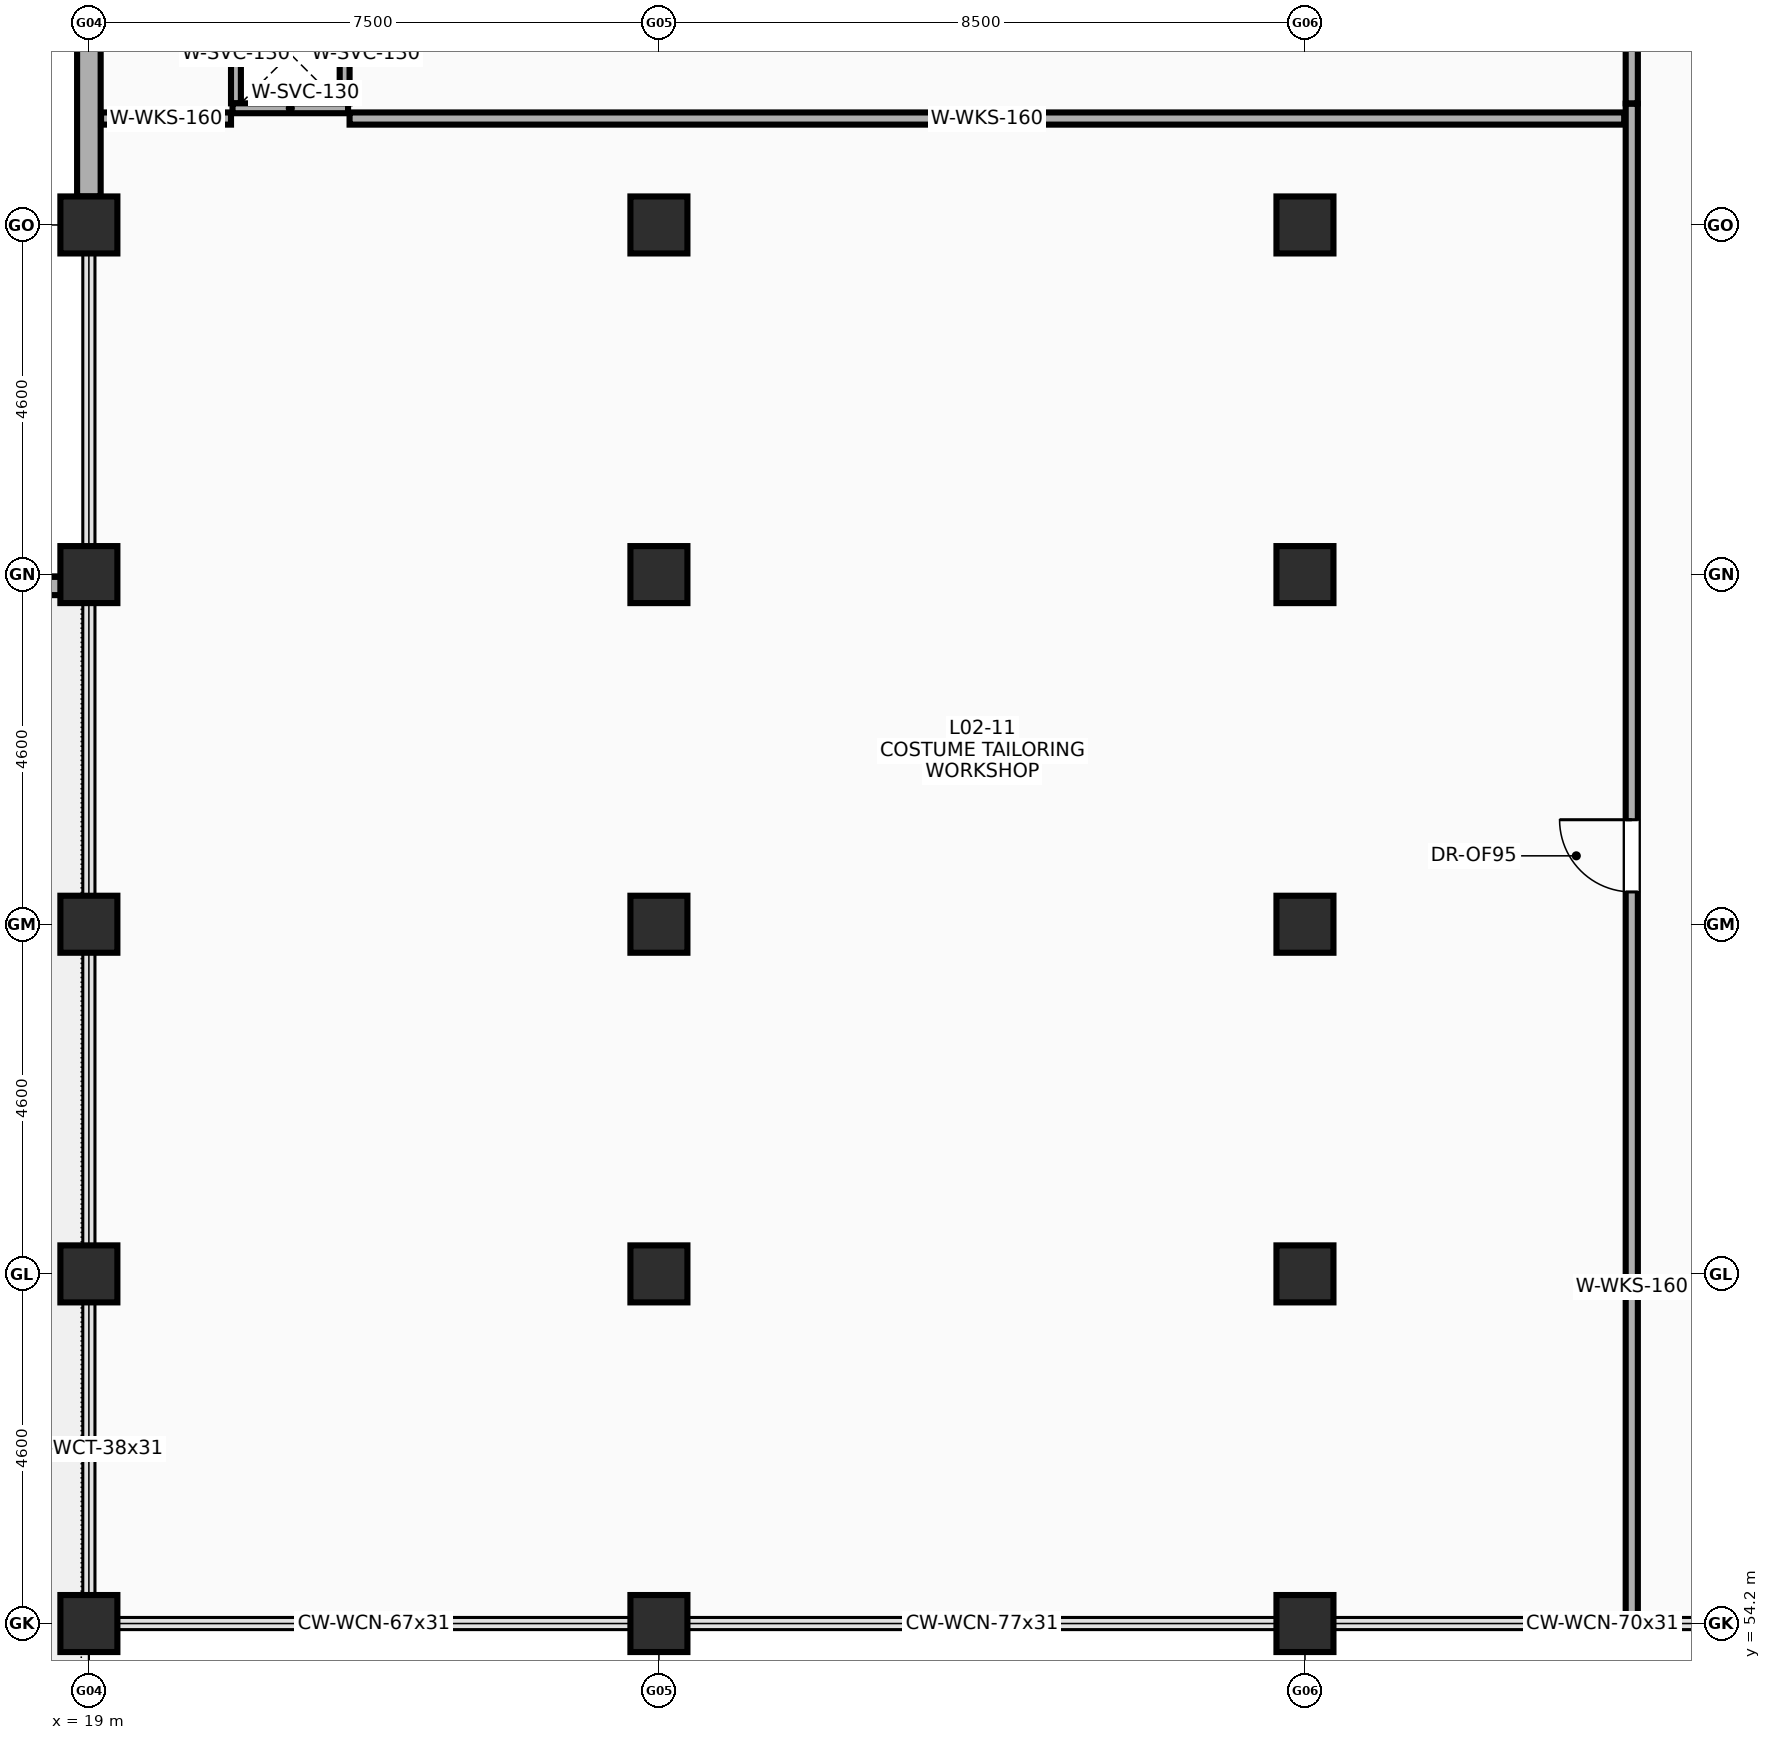
"""IFC4 building model, lengths in metres.
Left out: names, types, materials, properties, quantities, classifications, styles, units other than length and angle.
Written with IfcOpenShell. Run it as: python <this file> out.ifc"""

import sys

from ifc_helpers import new_model, si_unit, direction, frame, frame_2d, origin, origin_2d, place, context, subcontext, project, spatial, rectangle, extrude, element, fill, save


model = new_model("IFC4")
c1 = context("Model", 3, precision=1e-05, world=origin(), true_north=direction((0.0, 1.0)))
c2 = subcontext(c1, "Body", "Model", "MODEL_VIEW")
j1 = project(units=[si_unit("LENGTHUNIT", "METRE"), si_unit("PLANEANGLEUNIT", "RADIAN")], contexts=[c1])
p1 = place(None, origin())
s1 = spatial("IfcSite", under=j1, at=p1, CompositionType="ELEMENT")
p2 = place(p1, origin())
s2 = spatial("IfcBuilding", under=s1, at=p2, CompositionType="ELEMENT")
p3 = place(p2, frame((0.0, 0.0, 9.8)))
s3 = spatial("IfcBuildingStorey", under=s2, at=p3, CompositionType="ELEMENT", Elevation=9.8)
for number, where, z_axis, x_axis in (
    (1, (19.0, 54.2, 0.0), (0.0, 0.0, 1.0), (1.0, 0.0, 0.0)),
    (2, (19.0, 58.8, 0.0), (0.0, 0.0, 1.0), (1.0, 0.0, 0.0)),
    (3, (19.0, 63.4, 0.0), (0.0, 0.0, 1.0), (1.0, 0.0, 0.0)),
    (4, (19.0, 68.0, 0.0), (0.0, 0.0, 1.0), (1.0, 0.0, 0.0)),
    (5, (19.0, 72.6, 0.0), (0.0, 0.0, 1.0), (1.0, 0.0, 0.0)),
    (6, (26.5, 54.2, 0.0), (0.0, 0.0, 1.0), (1.0, 0.0, 0.0)),
    (7, (26.5, 58.8, 0.0), (0.0, 0.0, 1.0), (1.0, 0.0, 0.0)),
    (8, (26.5, 63.4, 0.0), (0.0, 0.0, 1.0), (1.0, 0.0, 0.0)),
    (9, (26.5, 68.0, 0.0), (0.0, 0.0, 1.0), (1.0, 0.0, 0.0)),
    (10, (26.5, 72.6, 0.0), (0.0, 0.0, 1.0), (1.0, 0.0, 0.0)),
    (11, (35.0, 54.2, 0.0), (0.0, 0.0, 1.0), (1.0, 0.0, 0.0)),
    (12, (35.0, 58.8, 0.0), (0.0, 0.0, 1.0), (1.0, 0.0, 0.0)),
    (13, (35.0, 63.4, 0.0), (0.0, 0.0, 1.0), (1.0, 0.0, 0.0)),
    (14, (35.0, 68.0, 0.0), (0.0, 0.0, 1.0), (1.0, 0.0, 0.0)),
    (15, (35.0, 72.6, 0.0), (0.0, 0.0, 1.0), (1.0, 0.0, 0.0)),
):
    element("IfcColumn", number, at=place(p3, frame(where, z_axis=z_axis, x_axis=x_axis)), inside=s3, PredefinedType="COLUMN", context=c2, shape_type="SweptSolid", body=[
        extrude(rectangle(XDim=0.75, YDim=0.75, at=origin_2d()), origin(), (0.0, 0.0, 1.0), 4.4),
    ])
p4 = place(p3, frame((19.0, 72.975, 0.0), z_axis=(0.0, 0.0, 1.0), x_axis=(0.0, 1.0, 0.0)))
e16 = element("IfcWall", 16, at=p4, inside=s3, PredefinedType="SOLIDWALL", context=c2, shape_type="SweptSolid", body=[
    extrude(rectangle(XDim=7.85, YDim=0.31, at=frame_2d((3.925, 0.0))), origin(), (0.0, 0.0, 1.0), 3.15),
])
p5 = place(p4, frame((2.705, 0.0, 0.9)))
e17 = element("IfcOpeningElement", 17, at=p5, cuts=e16, PredefinedType="OPENING", context=c2, shape_type="SweptSolid", body=[
    extrude(rectangle(XDim=2.4, YDim=1.9, at=frame_2d((1.2, 0.95))), frame((0.0, 0.165, 0.0), z_axis=(0.0, -1.0, 0.0), x_axis=(1.0, 0.0, 0.0)), (0.0, 0.0, 1.0), 0.33),
])
p6 = place(p3, frame((6.15, 67.85, 0.0), z_axis=(0.0, 0.0, 1.0), x_axis=(1.0, 0.0, 0.0)))
e18 = element("IfcWall", 18, at=p6, inside=s3, PredefinedType="PARAPET", context=c2, shape_type="SweptSolid", body=[
    extrude(rectangle(XDim=12.7, YDim=0.24, at=frame_2d((6.35, 0.0))), origin(), (0.0, 0.0, 1.0), 0.65),
])
for number, where, z_axis, x_axis in (
    (19, (20.935, 74.2, 0.0), (0.0, 0.0, 1.0), (0.0, 1.0, 0.0)),
    (20, (22.365, 74.2, 0.0), (0.0, 0.0, 1.0), (0.0, 1.0, 0.0)),
):
    element("IfcWall", number, at=place(p3, frame(where, z_axis=z_axis, x_axis=x_axis)), inside=s3, PredefinedType="PARTITIONING", context=c2, shape_type="SweptSolid", body=[
        extrude(rectangle(XDim=1.3, YDim=0.13, at=frame_2d((0.65, 0.0))), origin(), (0.0, 0.0, 1.0), 4.1),
    ])
p7 = place(p3, frame((39.3, 54.285, 0.0), z_axis=(0.0, 0.0, 1.0), x_axis=(0.0, 1.0, 0.0)))
e21 = element("IfcWall", 21, at=p7, inside=s3, PredefinedType="PARTITIONING", context=c2, shape_type="SweptSolid", body=[
    extrude(rectangle(XDim=19.91, YDim=0.16, at=frame_2d((9.955, 0.0))), origin(), (0.0, 0.0, 1.0), 3.3),
])
p8 = place(p7, frame((9.54, 0.0, 0.0)))
e22 = element("IfcOpeningElement", 22, at=p8, cuts=e21, PredefinedType="OPENING", context=c2, shape_type="SweptSolid", body=[
    extrude(rectangle(XDim=0.95, YDim=2.15, at=frame_2d((0.475, 1.075))), frame((0.0, 0.09, 0.0), z_axis=(0.0, -1.0, 0.0), x_axis=(1.0, 0.0, 0.0)), (0.0, 0.0, 1.0), 0.18),
])
p9 = place(p3, frame((39.3, 74.2, 0.0), z_axis=(0.0, 0.0, 1.0), x_axis=(0.0, 1.0, 0.0)))
e23 = element("IfcWall", 23, at=p9, inside=s3, PredefinedType="PARTITIONING", context=c2, shape_type="SweptSolid", body=[
    extrude(rectangle(XDim=11.135, YDim=0.16, at=frame_2d((5.567, 0.0))), origin(), (0.0, 0.0, 1.0), 3.3),
])
p10 = place(p9, frame((5.125, 0.0, 0.0)))
e24 = element("IfcOpeningElement", 24, at=p10, cuts=e23, PredefinedType="OPENING", context=c2, shape_type="SweptSolid", body=[
    extrude(rectangle(XDim=0.95, YDim=2.15, at=frame_2d((0.475, 1.075))), frame((0.0, 0.09, 0.0), z_axis=(0.0, -1.0, 0.0), x_axis=(1.0, 0.0, 0.0)), (0.0, 0.0, 1.0), 0.18),
])
p11 = place(p3, frame((19.16, 74.0, 0.0), z_axis=(0.0, 0.0, 1.0), x_axis=(1.0, 0.0, 0.0)))
e25 = element("IfcWall", 25, at=p11, inside=s3, PredefinedType="PARTITIONING", context=c2, shape_type="SweptSolid", body=[
    extrude(rectangle(XDim=1.71, YDim=0.16, at=frame_2d((0.855, 0.0))), origin(), (0.0, 0.0, 1.0), 3.3),
])
p12 = place(p3, frame((22.43, 74.0, 0.0), z_axis=(0.0, 0.0, 1.0), x_axis=(1.0, 0.0, 0.0)))
e26 = element("IfcWall", 26, at=p12, inside=s3, PredefinedType="PARTITIONING", context=c2, shape_type="SweptSolid", body=[
    extrude(rectangle(XDim=16.77, YDim=0.16, at=frame_2d((8.385, 0.0))), origin(), (0.0, 0.0, 1.0), 3.3),
])
p13 = place(p3, frame((20.89, 74.135, 0.0), z_axis=(0.0, 0.0, 1.0), x_axis=(1.0, 0.0, 0.0)))
e27 = element("IfcWall", 27, at=p13, inside=s3, PredefinedType="PARTITIONING", context=c2, shape_type="SweptSolid", body=[
    extrude(rectangle(XDim=1.52, YDim=0.13, at=frame_2d((0.76, 0.0))), origin(), (0.0, 0.0, 1.0), 4.1),
])
p14 = place(p8, origin())
e28 = element("IfcDoor", 28, at=p14, inside=s3, OperationType="SINGLE_SWING_RIGHT", PredefinedType="DOOR", context=c2, shape_type="SweptSolid", body=[
    extrude(rectangle(XDim=0.95, YDim=2.15, at=frame_2d((0.475, 1.075))), frame((0.0, 0.025, 0.0), z_axis=(0.0, -1.0, 0.0), x_axis=(1.0, 0.0, 0.0)), (0.0, 0.0, 1.0), 0.05),
])
fill(e22, e28)
save(model, sys.argv[1])
